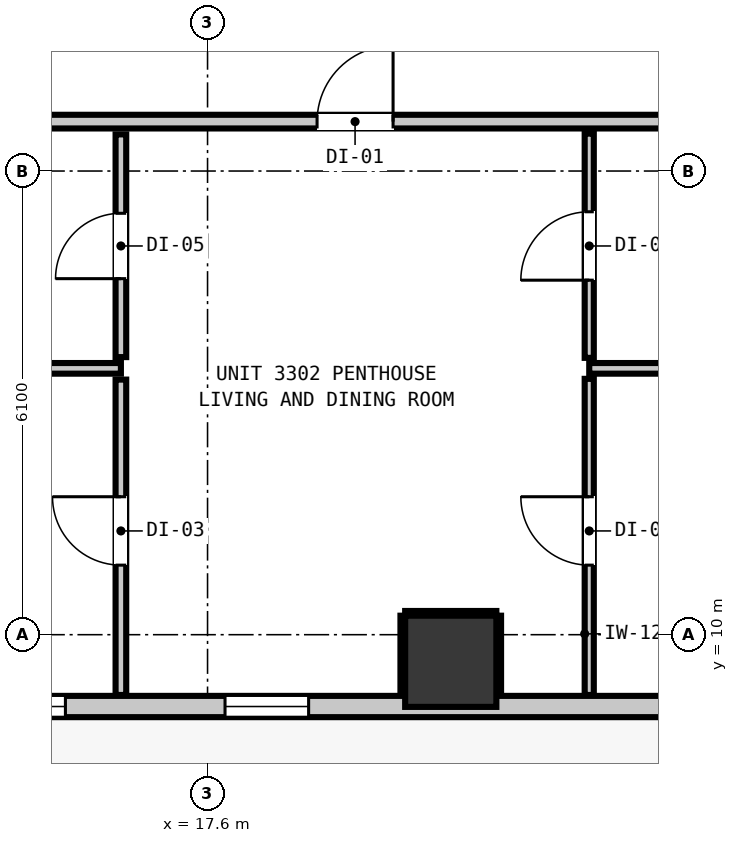
"""IFC4 building model, lengths in metres.
Left out: names, types, materials, properties, quantities, classifications, styles, units other than length and angle.
Written with IfcOpenShell. Run it as: python <this file> out.ifc"""

import sys

from ifc_helpers import new_model, si_unit, direction, frame, frame_2d, origin, origin_2d, place, context, subcontext, project, spatial, rectangle, extrude, element, fill, save


model = new_model("IFC4")
c1 = context("Model", 3, precision=1e-05, world=origin(), true_north=direction((0.0, 1.0)))
c2 = subcontext(c1, "Body", "Model", "MODEL_VIEW")
j1 = project(units=[si_unit("LENGTHUNIT", "METRE"), si_unit("PLANEANGLEUNIT", "RADIAN")], contexts=[c1])
p1 = place(None, origin())
s1 = spatial("IfcSite", under=j1, at=p1, CompositionType="ELEMENT")
p2 = place(p1, origin())
s2 = spatial("IfcBuilding", under=s1, at=p2, CompositionType="ELEMENT")
p3 = place(p2, frame((0.0, 0.0, 116.04)))
s3 = spatial("IfcBuildingStorey", under=s2, at=p3, CompositionType="ELEMENT", Elevation=116.04)
p4 = place(p3, frame((20.8, 9.65, 0.0), z_axis=(0.0, 0.0, 1.0), x_axis=(1.0, 0.0, 0.0)))
e1 = element("IfcColumn", 1, at=p4, inside=s3, PredefinedType="COLUMN", context=c2, shape_type="SweptSolid", body=[
    extrude(rectangle(XDim=1.2, YDim=1.2, at=origin_2d()), origin(), (0.0, 0.0, 1.0), 3.32),
])
p5 = place(p3, frame((40.445, 9.055, 0.0), z_axis=(0.0, 0.0, 1.0), x_axis=(-1.0, 0.0, 0.0)))
e2 = element("IfcWall", 2, at=p5, inside=s3, PredefinedType="STANDARD", context=c2, shape_type="SweptSolid", body=[
    extrude(rectangle(XDim=35.09, YDim=0.28, at=frame_2d((17.545, 0.0))), origin(), (0.0, 0.0, 1.0), 3.08),
])
p6 = place(p5, frame((5.114, 0.0, 0.0)))
e3 = element("IfcOpeningElement", 3, at=p6, cuts=e2, PredefinedType="OPENING", context=c2, shape_type="SweptSolid", body=[
    extrude(rectangle(XDim=1.0, YDim=2.15, at=frame_2d((0.5, 1.075))), frame((0.0, 0.15, 0.0), z_axis=(0.0, -1.0, 0.0), x_axis=(1.0, 0.0, 0.0)), (0.0, 0.0, 1.0), 0.3),
])
p7 = place(p5, frame((31.877, 0.0, 0.85)))
e4 = element("IfcOpeningElement", 4, at=p7, cuts=e2, PredefinedType="OPENING", context=c2, shape_type="SweptSolid", body=[
    extrude(rectangle(XDim=1.1, YDim=2.05, at=frame_2d((0.55, 1.025))), frame((0.0, 0.15, 0.0), z_axis=(0.0, -1.0, 0.0), x_axis=(1.0, 0.0, 0.0)), (0.0, 0.0, 1.0), 0.3),
])
p8 = place(p5, frame((34.198, 0.0, 0.85)))
e5 = element("IfcOpeningElement", 5, at=p8, cuts=e2, PredefinedType="OPENING", context=c2, shape_type="SweptSolid", body=[
    extrude(rectangle(XDim=0.58, YDim=1.5, at=frame_2d((0.29, 0.75))), frame((0.0, 0.15, 0.0), z_axis=(0.0, -1.0, 0.0), x_axis=(1.0, 0.0, 0.0)), (0.0, 0.0, 1.0), 0.3),
])
p9 = place(p5, frame((21.515, 0.0, 0.85)))
e6 = element("IfcOpeningElement", 6, at=p9, cuts=e2, PredefinedType="OPENING", context=c2, shape_type="SweptSolid", body=[
    extrude(rectangle(XDim=1.1, YDim=2.05, at=frame_2d((0.55, 1.025))), frame((0.0, 0.15, 0.0), z_axis=(0.0, -1.0, 0.0), x_axis=(1.0, 0.0, 0.0)), (0.0, 0.0, 1.0), 0.3),
])
p10 = place(p5, frame((24.715, 0.0, 0.85)))
e7 = element("IfcOpeningElement", 7, at=p10, cuts=e2, PredefinedType="OPENING", context=c2, shape_type="SweptSolid", body=[
    extrude(rectangle(XDim=1.1, YDim=2.05, at=frame_2d((0.55, 1.025))), frame((0.0, 0.15, 0.0), z_axis=(0.0, -1.0, 0.0), x_axis=(1.0, 0.0, 0.0)), (0.0, 0.0, 1.0), 0.3),
])
p11 = place(p5, frame((14.824, 0.0, 0.85)))
e8 = element("IfcOpeningElement", 8, at=p11, cuts=e2, PredefinedType="OPENING", context=c2, shape_type="SweptSolid", body=[
    extrude(rectangle(XDim=1.1, YDim=2.05, at=frame_2d((0.55, 1.025))), frame((0.0, 0.15, 0.0), z_axis=(0.0, -1.0, 0.0), x_axis=(1.0, 0.0, 0.0)), (0.0, 0.0, 1.0), 0.3),
])
p12 = place(p5, frame((6.682, 0.0, 0.85)))
e9 = element("IfcOpeningElement", 9, at=p12, cuts=e2, PredefinedType="OPENING", context=c2, shape_type="SweptSolid", body=[
    extrude(rectangle(XDim=1.1, YDim=2.05, at=frame_2d((0.55, 1.025))), frame((0.0, 0.15, 0.0), z_axis=(0.0, -1.0, 0.0), x_axis=(1.0, 0.0, 0.0)), (0.0, 0.0, 1.0), 0.3),
])
p13 = place(p5, frame((8.948, 0.0, 0.85)))
e10 = element("IfcOpeningElement", 10, at=p13, cuts=e2, PredefinedType="OPENING", context=c2, shape_type="SweptSolid", body=[
    extrude(rectangle(XDim=1.1, YDim=2.05, at=frame_2d((0.55, 1.025))), frame((0.0, 0.15, 0.0), z_axis=(0.0, -1.0, 0.0), x_axis=(1.0, 0.0, 0.0)), (0.0, 0.0, 1.0), 0.3),
])
p14 = place(p3, frame((3.207, 16.75, 0.0), z_axis=(0.0, 0.0, 1.0), x_axis=(1.0, 0.0, 0.0)))
e11 = element("IfcWall", 11, at=p14, inside=s3, PredefinedType="PARTITIONING", context=c2, shape_type="SweptSolid", body=[
    extrude(rectangle(XDim=39.386, YDim=0.18, at=frame_2d((19.693, 0.0))), origin(), (0.0, 0.0, 1.0), 3.08),
])
p15 = place(p14, frame((4.311, 0.0, 0.0)))
e12 = element("IfcOpeningElement", 12, at=p15, cuts=e11, PredefinedType="OPENING", context=c2, shape_type="SweptSolid", body=[
    extrude(rectangle(XDim=1.0, YDim=2.15, at=frame_2d((0.5, 1.075))), frame((0.0, 0.1, 0.0), z_axis=(0.0, -1.0, 0.0), x_axis=(1.0, 0.0, 0.0)), (0.0, 0.0, 1.0), 0.2),
])
p16 = place(p14, frame((15.834, 0.0, 0.0)))
e13 = element("IfcOpeningElement", 13, at=p16, cuts=e11, PredefinedType="OPENING", context=c2, shape_type="SweptSolid", body=[
    extrude(rectangle(XDim=1.0, YDim=2.15, at=frame_2d((0.5, 1.075))), frame((0.0, 0.1, 0.0), z_axis=(0.0, -1.0, 0.0), x_axis=(1.0, 0.0, 0.0)), (0.0, 0.0, 1.0), 0.2),
])
p17 = place(p14, frame((31.654, 0.0, 0.0)))
e14 = element("IfcOpeningElement", 14, at=p17, cuts=e11, PredefinedType="OPENING", context=c2, shape_type="SweptSolid", body=[
    extrude(rectangle(XDim=1.0, YDim=2.15, at=frame_2d((0.5, 1.075))), frame((0.0, 0.1, 0.0), z_axis=(0.0, -1.0, 0.0), x_axis=(1.0, 0.0, 0.0)), (0.0, 0.0, 1.0), 0.2),
])
p18 = place(p3, frame((11.72, 13.504, 0.0), z_axis=(0.0, 0.0, 1.0), x_axis=(1.0, 0.0, 0.0)))
e15 = element("IfcWall", 15, at=p18, inside=s3, PredefinedType="PARTITIONING", context=c2, shape_type="SweptSolid", body=[
    extrude(rectangle(XDim=4.74, YDim=0.14, at=frame_2d((2.37, 0.0))), origin(), (0.0, 0.0, 1.0), 3.08),
])
p19 = place(p3, frame((22.622, 13.504, 0.0), z_axis=(0.0, 0.0, 1.0), x_axis=(1.0, 0.0, 0.0)))
e16 = element("IfcWall", 16, at=p19, inside=s3, PredefinedType="PARTITIONING", context=c2, shape_type="SweptSolid", body=[
    extrude(rectangle(XDim=9.573, YDim=0.14, at=frame_2d((4.787, 0.0))), origin(), (0.0, 0.0, 1.0), 3.08),
])
p20 = place(p3, frame((16.46, 9.207, 0.0), z_axis=(0.0, 0.0, 1.0), x_axis=(0.0, 1.0, 0.0)))
e17 = element("IfcWall", 17, at=p20, inside=s3, PredefinedType="PARTITIONING", context=c2, shape_type="SweptSolid", body=[
    extrude(rectangle(XDim=4.149, YDim=0.14, at=frame_2d((2.074, 0.0))), origin(), (0.0, 0.0, 1.0), 3.08),
])
p21 = place(p20, frame((1.708, 0.0, 0.0)))
e18 = element("IfcOpeningElement", 18, at=p21, cuts=e17, PredefinedType="OPENING", context=c2, shape_type="SweptSolid", body=[
    extrude(rectangle(XDim=0.9, YDim=2.1, at=frame_2d((0.45, 1.05))), frame((0.0, 0.08, 0.0), z_axis=(0.0, -1.0, 0.0), x_axis=(1.0, 0.0, 0.0)), (0.0, 0.0, 1.0), 0.16),
])
p22 = place(p3, frame((16.46, 13.652, 0.0), z_axis=(0.0, 0.0, 1.0), x_axis=(0.0, 1.0, 0.0)))
e19 = element("IfcWall", 19, at=p22, inside=s3, PredefinedType="PARTITIONING", context=c2, shape_type="SweptSolid", body=[
    extrude(rectangle(XDim=2.93, YDim=0.14, at=frame_2d((1.465, 0.0))), origin(), (0.0, 0.0, 1.0), 3.08),
])
p23 = place(p22, frame((1.032, 0.0, 0.0)))
e20 = element("IfcOpeningElement", 20, at=p23, cuts=e19, PredefinedType="OPENING", context=c2, shape_type="SweptSolid", body=[
    extrude(rectangle(XDim=0.86, YDim=2.02, at=frame_2d((0.43, 1.01))), frame((0.0, 0.08, 0.0), z_axis=(0.0, -1.0, 0.0), x_axis=(1.0, 0.0, 0.0)), (0.0, 0.0, 1.0), 0.16),
])
p24 = place(p3, frame((22.622, 9.207, 0.0), z_axis=(0.0, 0.0, 1.0), x_axis=(0.0, 1.0, 0.0)))
e21 = element("IfcWall", 21, at=p24, inside=s3, PredefinedType="PARTITIONING", context=c2, shape_type="SweptSolid", body=[
    extrude(rectangle(XDim=4.159, YDim=0.12, at=frame_2d((2.08, 0.0))), origin(), (0.0, 0.0, 1.0), 3.08),
])
p25 = place(p24, frame((1.708, 0.0, 0.0)))
e22 = element("IfcOpeningElement", 22, at=p25, cuts=e21, PredefinedType="OPENING", context=c2, shape_type="SweptSolid", body=[
    extrude(rectangle(XDim=0.9, YDim=2.1, at=frame_2d((0.45, 1.05))), frame((0.0, 0.07, 0.0), z_axis=(0.0, -1.0, 0.0), x_axis=(1.0, 0.0, 0.0)), (0.0, 0.0, 1.0), 0.14),
])
p26 = place(p3, frame((22.622, 13.642, 0.0), z_axis=(0.0, 0.0, 1.0), x_axis=(0.0, 1.0, 0.0)))
e23 = element("IfcWall", 23, at=p26, inside=s3, PredefinedType="PARTITIONING", context=c2, shape_type="SweptSolid", body=[
    extrude(rectangle(XDim=2.95, YDim=0.12, at=frame_2d((1.475, 0.0))), origin(), (0.0, 0.0, 1.0), 3.08),
])
p27 = place(p26, frame((1.022, 0.0, 0.0)))
e24 = element("IfcOpeningElement", 24, at=p27, cuts=e23, PredefinedType="OPENING", context=c2, shape_type="SweptSolid", body=[
    extrude(rectangle(XDim=0.9, YDim=2.1, at=frame_2d((0.45, 1.05))), frame((0.0, 0.07, 0.0), z_axis=(0.0, -1.0, 0.0), x_axis=(1.0, 0.0, 0.0)), (0.0, 0.0, 1.0), 0.14),
])
p28 = place(p3, frame((20.2, 10.282, 0.0), z_axis=(0.0, 0.0, 1.0), x_axis=(1.0, 0.0, 0.0)))
e25 = element("IfcWall", 25, at=p28, inside=s3, PredefinedType="PARTITIONING", context=c2, shape_type="SweptSolid", body=[
    extrude(rectangle(XDim=1.2, YDim=0.06, at=frame_2d((0.6, 0.0))), origin(), (0.0, 0.0, 1.0), 1.45),
])
for number, where, z_axis, x_axis in (
    (26, (20.168, 9.21, 0.0), (0.0, 0.0, 1.0), (0.0, 1.0, 0.0)),
    (27, (21.432, 9.21, 0.0), (0.0, 0.0, 1.0), (0.0, 1.0, 0.0)),
):
    element("IfcWall", number, at=place(p3, frame(where, z_axis=z_axis, x_axis=x_axis)), inside=s3, PredefinedType="PARTITIONING", context=c2, shape_type="SweptSolid", body=[
        extrude(rectangle(XDim=1.04, YDim=0.06, at=frame_2d((0.52, 0.0))), origin(), (0.0, 0.0, 1.0), 1.45),
    ])
p29 = place(p9, origin())
e28 = element("IfcWindow", 28, at=p29, inside=s3, PartitioningType="SINGLE_PANEL", PredefinedType="WINDOW", context=c2, shape_type="SweptSolid", body=[
    extrude(rectangle(XDim=1.1, YDim=2.05, at=frame_2d((0.55, 1.025))), frame((0.0, 0.03, 0.0), z_axis=(0.0, -1.0, 0.0), x_axis=(1.0, 0.0, 0.0)), (0.0, 0.0, 1.0), 0.06),
])
fill(e6, e28)
p30 = place(p10, origin())
e29 = element("IfcWindow", 29, at=p30, inside=s3, PartitioningType="SINGLE_PANEL", PredefinedType="WINDOW", context=c2, shape_type="SweptSolid", body=[
    extrude(rectangle(XDim=1.1, YDim=2.05, at=frame_2d((0.55, 1.025))), frame((0.0, 0.03, 0.0), z_axis=(0.0, -1.0, 0.0), x_axis=(1.0, 0.0, 0.0)), (0.0, 0.0, 1.0), 0.06),
])
fill(e7, e29)
p31 = place(p16, origin())
e30 = element("IfcDoor", 30, at=p31, inside=s3, OperationType="SINGLE_SWING_RIGHT", PredefinedType="DOOR", context=c2, shape_type="SweptSolid", body=[
    extrude(rectangle(XDim=1.0, YDim=2.15, at=frame_2d((0.5, 1.075))), frame((0.0, 0.025, 0.0), z_axis=(0.0, -1.0, 0.0), x_axis=(1.0, 0.0, 0.0)), (0.0, 0.0, 1.0), 0.05),
])
fill(e13, e30)
p32 = place(p23, origin())
e31 = element("IfcDoor", 31, at=p32, inside=s3, OperationType="SINGLE_SWING_LEFT", PredefinedType="DOOR", context=c2, shape_type="SweptSolid", body=[
    extrude(rectangle(XDim=0.86, YDim=2.02, at=frame_2d((0.43, 1.01))), frame((0.0, 0.025, 0.0), z_axis=(0.0, -1.0, 0.0), x_axis=(1.0, 0.0, 0.0)), (0.0, 0.0, 1.0), 0.05),
])
fill(e20, e31)
p33 = place(p21, origin())
e32 = element("IfcDoor", 32, at=p33, inside=s3, OperationType="SINGLE_SWING_RIGHT", PredefinedType="DOOR", context=c2, shape_type="SweptSolid", body=[
    extrude(rectangle(XDim=0.9, YDim=2.1, at=frame_2d((0.45, 1.05))), frame((0.0, 0.025, 0.0), z_axis=(0.0, -1.0, 0.0), x_axis=(1.0, 0.0, 0.0)), (0.0, 0.0, 1.0), 0.05),
])
fill(e18, e32)
p34 = place(p27, origin())
e33 = element("IfcDoor", 33, at=p34, inside=s3, OperationType="SINGLE_SWING_LEFT", PredefinedType="DOOR", context=c2, shape_type="SweptSolid", body=[
    extrude(rectangle(XDim=0.9, YDim=2.1, at=frame_2d((0.45, 1.05))), frame((0.0, 0.025, 0.0), z_axis=(0.0, -1.0, 0.0), x_axis=(1.0, 0.0, 0.0)), (0.0, 0.0, 1.0), 0.05),
])
fill(e24, e33)
p35 = place(p25, origin())
e34 = element("IfcDoor", 34, at=p35, inside=s3, OperationType="SINGLE_SWING_RIGHT", PredefinedType="DOOR", context=c2, shape_type="SweptSolid", body=[
    extrude(rectangle(XDim=0.9, YDim=2.1, at=frame_2d((0.45, 1.05))), frame((0.0, 0.025, 0.0), z_axis=(0.0, -1.0, 0.0), x_axis=(1.0, 0.0, 0.0)), (0.0, 0.0, 1.0), 0.05),
])
fill(e22, e34)
save(model, sys.argv[1])
